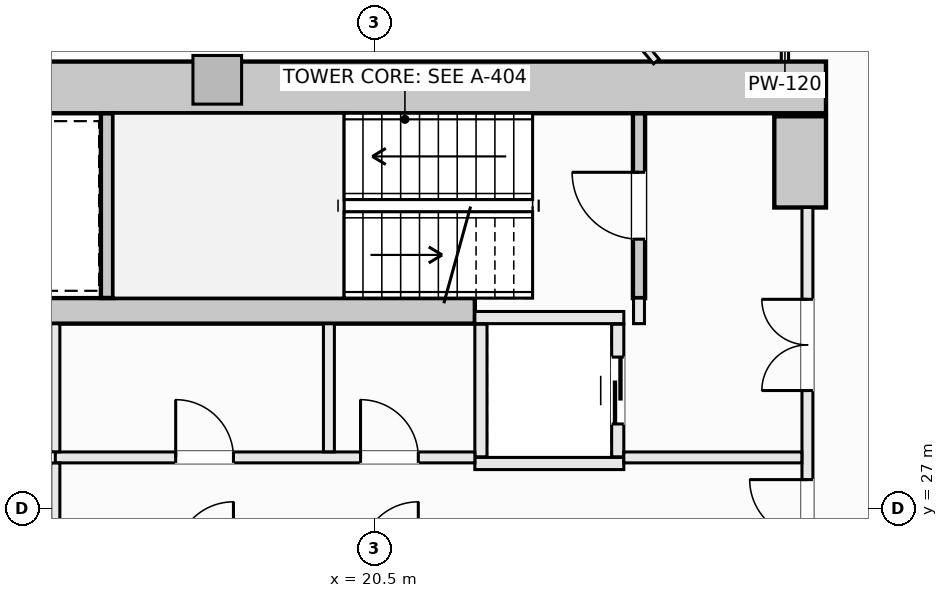
"""IFC4 building model, lengths in metres.
Left out: names, types, materials, properties, quantities, classifications, styles, units other than length and angle.
Written with IfcOpenShell. Run it as: python <this file> out.ifc"""

import sys

from ifc_helpers import new_model, si_unit, direction, frame, frame_2d, origin, origin_2d, place, context, subcontext, project, spatial, rectangle, extrude, element, fill, save


model = new_model("IFC4")
c1 = context("Model", 3, precision=1e-05, world=origin(), true_north=direction((0.0, 1.0)))
c2 = subcontext(c1, "Body", "Model", "MODEL_VIEW")
j1 = project(units=[si_unit("LENGTHUNIT", "METRE"), si_unit("PLANEANGLEUNIT", "RADIAN")], contexts=[c1])
p1 = place(None, origin())
s1 = spatial("IfcSite", under=j1, at=p1, CompositionType="ELEMENT")
p2 = place(p1, origin())
s2 = spatial("IfcBuilding", under=s1, at=p2, CompositionType="ELEMENT")
p3 = place(p2, frame((0.0, 0.0, 84.25)))
s3 = spatial("IfcBuildingStorey", under=s2, at=p3, CompositionType="ELEMENT", Elevation=84.25)
p4 = place(p3, frame((14.075, 33.925, -0.28), z_axis=(0.0, 0.0, 1.0), x_axis=(1.0, 0.0, 0.0)))
e1 = element("IfcWall", 1, at=p4, inside=s3, PredefinedType="SHEAR", context=c2, shape_type="SweptSolid", body=[
    extrude(rectangle(XDim=13.85, YDim=0.85, at=frame_2d((6.925, 0.0))), origin(), (0.0, 0.0, 1.0), 3.85),
])
p5 = place(p3, frame((27.5, 31.95, -0.28), z_axis=(0.0, 0.0, 1.0), x_axis=(0.0, 1.0, 0.0)))
e2 = element("IfcWall", 2, at=p5, inside=s3, PredefinedType="SHEAR", context=c2, shape_type="SweptSolid", body=[
    extrude(rectangle(XDim=1.5, YDim=0.85, at=frame_2d((0.75, 0.0))), origin(), (0.0, 0.0, 1.0), 3.85),
])
p6 = place(p3, frame((14.85, 30.25, -0.28), z_axis=(0.0, 0.0, 1.0), x_axis=(1.0, 0.0, 0.0)))
e3 = element("IfcWall", 3, at=p6, inside=s3, PredefinedType="SHEAR", context=c2, shape_type="SweptSolid", body=[
    extrude(rectangle(XDim=7.3, YDim=0.42, at=frame_2d((3.65, 0.0))), origin(), (0.0, 0.0, 1.0), 3.85),
])
p7 = place(p3, frame((17.914, 34.05, -0.28), z_axis=(0.0, 0.0, 1.0), x_axis=(1.0, 0.0, 0.0)))
e4 = element("IfcColumn", 4, at=p7, inside=s3, PredefinedType="PILASTER", context=c2, shape_type="SweptSolid", body=[
    extrude(rectangle(XDim=0.8, YDim=0.8, at=origin_2d()), origin(), (0.0, 0.0, 1.0), 3.85),
])
p8 = place(p3, frame((24.85, 30.46, -0.28), z_axis=(0.0, 0.0, 1.0), x_axis=(0.0, 1.0, 0.0)))
e5 = element("IfcWall", 5, at=p8, inside=s3, PredefinedType="SHEAR", context=c2, shape_type="SweptSolid", body=[
    extrude(rectangle(XDim=3.038, YDim=0.2, at=frame_2d((1.519, 0.0))), origin(), (0.0, 0.0, 1.0), 3.85),
])
p9 = place(p8, frame((0.969, 0.0, 0.28)))
e6 = element("IfcOpeningElement", 6, at=p9, cuts=e5, PredefinedType="OPENING", context=c2, shape_type="SweptSolid", body=[
    extrude(rectangle(XDim=1.1, YDim=2.15, at=frame_2d((0.55, 1.075))), frame((0.0, 0.11, 0.0), z_axis=(0.0, -1.0, 0.0), x_axis=(1.0, 0.0, 0.0)), (0.0, 0.0, 1.0), 0.22),
])
p10 = place(p3, frame((16.1, 30.462, -0.28), z_axis=(0.0, 0.0, 1.0), x_axis=(0.0, 1.0, 0.0)))
e7 = element("IfcWall", 7, at=p10, inside=s3, PredefinedType="SHEAR", context=c2, shape_type="SweptSolid", body=[
    extrude(rectangle(XDim=3.036, YDim=0.2, at=frame_2d((1.518, 0.0))), origin(), (0.0, 0.0, 1.0), 3.85),
])
for number, where, z_axis, x_axis in (
    (8, (22.15, 30.14, 0.0), (0.0, 0.0, 1.0), (1.0, 0.0, 0.0)),
    (9, (22.15, 27.74, 0.0), (0.0, 0.0, 1.0), (1.0, 0.0, 0.0)),
):
    element("IfcWall", number, at=place(p3, frame(where, z_axis=z_axis, x_axis=x_axis)), inside=s3, PredefinedType="SOLIDWALL", context=c2, shape_type="SweptSolid", body=[
        extrude(rectangle(XDim=2.45, YDim=0.2, at=frame_2d((1.225, 0.0))), origin(), (0.0, 0.0, 1.0), 3.57),
    ])
p11 = place(p3, frame((22.25, 27.85, 0.0), z_axis=(0.0, 0.0, 1.0), x_axis=(0.0, 1.0, 0.0)))
e10 = element("IfcWall", 10, at=p11, inside=s3, PredefinedType="SOLIDWALL", context=c2, shape_type="SweptSolid", body=[
    extrude(rectangle(XDim=2.18, YDim=0.2, at=frame_2d((1.09, 0.0))), origin(), (0.0, 0.0, 1.0), 3.57),
])
p12 = place(p3, frame((24.5, 27.85, 0.0), z_axis=(0.0, 0.0, 1.0), x_axis=(0.0, 1.0, 0.0)))
e11 = element("IfcWall", 11, at=p12, inside=s3, PredefinedType="SOLIDWALL", context=c2, shape_type="SweptSolid", body=[
    extrude(rectangle(XDim=2.18, YDim=0.2, at=frame_2d((1.09, 0.0))), origin(), (0.0, 0.0, 1.0), 3.57),
])
p13 = place(p12, frame((0.54, 0.0, 0.0)))
e12 = element("IfcOpeningElement", 12, at=p13, cuts=e11, PredefinedType="OPENING", context=c2, shape_type="SweptSolid", body=[
    extrude(rectangle(XDim=1.1, YDim=2.2, at=frame_2d((0.55, 1.1))), frame((0.0, 0.11, 0.0), z_axis=(0.0, -1.0, 0.0), x_axis=(1.0, 0.0, 0.0)), (0.0, 0.0, 1.0), 0.22),
])
p14 = place(p3, frame((24.85, 30.04, 0.0), z_axis=(0.0, 0.0, 1.0), x_axis=(0.0, 1.0, 0.0)))
e13 = element("IfcWall", 13, at=p14, inside=s3, PredefinedType="SOLIDWALL", context=c2, shape_type="SweptSolid", body=[
    extrude(rectangle(XDim=0.42, YDim=0.18, at=frame_2d((0.21, 0.0))), origin(), (0.0, 0.0, 1.0), 3.57),
])
p15 = place(p3, frame((27.62, 22.05, 0.0), z_axis=(0.0, 0.0, 1.0), x_axis=(0.0, 1.0, 0.0)))
e14 = element("IfcWall", 14, at=p15, inside=s3, PredefinedType="SOLIDWALL", context=c2, shape_type="SweptSolid", body=[
    extrude(rectangle(XDim=9.9, YDim=0.18, at=frame_2d((4.95, 0.0))), origin(), (0.0, 0.0, 1.0), 2.662),
])
p16 = place(p15, frame((4.475, 0.0, 0.0)))
e15 = element("IfcOpeningElement", 15, at=p16, cuts=e14, PredefinedType="OPENING", context=c2, shape_type="SweptSolid", body=[
    extrude(rectangle(XDim=0.95, YDim=2.1, at=frame_2d((0.475, 1.05))), frame((0.0, 0.1, 0.0), z_axis=(0.0, -1.0, 0.0), x_axis=(1.0, 0.0, 0.0)), (0.0, 0.0, 1.0), 0.2),
])
p17 = place(p15, frame((6.89, 0.0, 0.0)))
e16 = element("IfcOpeningElement", 16, at=p17, cuts=e14, PredefinedType="OPENING", context=c2, shape_type="SweptSolid", body=[
    extrude(rectangle(XDim=1.5, YDim=2.2, at=frame_2d((0.75, 1.1))), frame((0.0, 0.1, 0.0), z_axis=(0.0, -1.0, 0.0), x_axis=(1.0, 0.0, 0.0)), (0.0, 0.0, 1.0), 0.2),
])
p18 = place(p15, frame((1.51, 0.0, 0.0)))
e17 = element("IfcOpeningElement", 17, at=p18, cuts=e14, PredefinedType="OPENING", context=c2, shape_type="SweptSolid", body=[
    extrude(rectangle(XDim=1.5, YDim=2.2, at=frame_2d((0.75, 1.1))), frame((0.0, 0.1, 0.0), z_axis=(0.0, -1.0, 0.0), x_axis=(1.0, 0.0, 0.0)), (0.0, 0.0, 1.0), 0.2),
])
p19 = place(p3, frame((15.25, 27.84, 0.0), z_axis=(0.0, 0.0, 1.0), x_axis=(1.0, 0.0, 0.0)))
e18 = element("IfcWall", 18, at=p19, inside=s3, PredefinedType="SOLIDWALL", context=c2, shape_type="SweptSolid", body=[
    extrude(rectangle(XDim=6.9, YDim=0.18, at=frame_2d((3.45, 0.0))), origin(), (0.0, 0.0, 1.0), 3.57),
])
p20 = place(p19, frame((5.02, 0.0, 0.0)))
e19 = element("IfcOpeningElement", 19, at=p20, cuts=e18, PredefinedType="OPENING", context=c2, shape_type="SweptSolid", body=[
    extrude(rectangle(XDim=0.95, YDim=2.1, at=frame_2d((0.475, 1.05))), frame((0.0, 0.1, 0.0), z_axis=(0.0, -1.0, 0.0), x_axis=(1.0, 0.0, 0.0)), (0.0, 0.0, 1.0), 0.2),
])
p21 = place(p19, frame((1.98, 0.0, 0.0)))
e20 = element("IfcOpeningElement", 20, at=p21, cuts=e18, PredefinedType="OPENING", context=c2, shape_type="SweptSolid", body=[
    extrude(rectangle(XDim=0.95, YDim=2.1, at=frame_2d((0.475, 1.05))), frame((0.0, 0.1, 0.0), z_axis=(0.0, -1.0, 0.0), x_axis=(1.0, 0.0, 0.0)), (0.0, 0.0, 1.0), 0.2),
])
p22 = place(p3, frame((24.6, 27.84, 0.0), z_axis=(0.0, 0.0, 1.0), x_axis=(1.0, 0.0, 0.0)))
e21 = element("IfcWall", 21, at=p22, inside=s3, PredefinedType="SOLIDWALL", context=c2, shape_type="SweptSolid", body=[
    extrude(rectangle(XDim=2.928, YDim=0.18, at=frame_2d((1.464, 0.0))), origin(), (0.0, 0.0, 1.0), 3.57),
])
p23 = place(p3, frame((15.25, 26.252, 0.0), z_axis=(0.0, 0.0, 1.0), x_axis=(0.0, 1.0, 0.0)))
e22 = element("IfcWall", 22, at=p23, inside=s3, PredefinedType="PARTITIONING", context=c2, shape_type="SweptSolid", body=[
    extrude(rectangle(XDim=1.496, YDim=0.15, at=frame_2d((0.748, 0.0))), origin(), (0.0, 0.0, 1.0), 3.57),
])
p24 = place(p3, frame((15.25, 27.932, 0.0), z_axis=(0.0, 0.0, 1.0), x_axis=(0.0, 1.0, 0.0)))
e23 = element("IfcWall", 23, at=p24, inside=s3, PredefinedType="PARTITIONING", context=c2, shape_type="SweptSolid", body=[
    extrude(rectangle(XDim=2.106, YDim=0.15, at=frame_2d((1.053, 0.0))), origin(), (0.0, 0.0, 1.0), 3.57),
])
p25 = place(p3, frame((19.75, 27.932, 0.0), z_axis=(0.0, 0.0, 1.0), x_axis=(0.0, 1.0, 0.0)))
e24 = element("IfcWall", 24, at=p25, inside=s3, PredefinedType="SOLIDWALL", context=c2, shape_type="SweptSolid", body=[
    extrude(rectangle(XDim=2.106, YDim=0.18, at=frame_2d((1.053, 0.0))), origin(), (0.0, 0.0, 1.0), 3.57),
])
p26 = place(p3, frame((27.25, 34.352, 0.0), z_axis=(0.0, 0.0, 1.0), x_axis=(0.0, 1.0, 0.0)))
e25 = element("IfcWall", 25, at=p26, inside=s3, PredefinedType="PARTITIONING", context=c2, shape_type="SweptSolid", body=[
    extrude(rectangle(XDim=0.606, YDim=0.12, at=frame_2d((0.303, 0.0))), origin(), (0.0, 0.0, 1.0), 3.57),
])
p27 = place(p3, frame((24.626, 34.958, 0.0), z_axis=(0.0, 0.0, 1.0), x_axis=(0.643032873298, -0.765838575588, 0.0)))
e26 = element("IfcWall", 26, at=p27, inside=s3, PredefinedType="PARTITIONING", context=c2, shape_type="SweptSolid", body=[
    extrude(rectangle(XDim=0.791, YDim=0.12, at=frame_2d((0.396, 0.0))), origin(), (0.0, 0.0, 1.0), 3.57),
])
p28 = place(p9, origin())
e27 = element("IfcDoor", 27, at=p28, inside=s3, OperationType="SINGLE_SWING_RIGHT", PredefinedType="DOOR", context=c2, shape_type="SweptSolid", body=[
    extrude(rectangle(XDim=1.1, YDim=2.15, at=frame_2d((0.55, 1.075))), frame((0.0, 0.025, 0.0), z_axis=(0.0, -1.0, 0.0), x_axis=(1.0, 0.0, 0.0)), (0.0, 0.0, 1.0), 0.05),
])
fill(e6, e27)
p29 = place(p13, origin())
e28 = element("IfcDoor", 28, at=p29, inside=s3, OperationType="SLIDING_TO_LEFT", PredefinedType="DOOR", context=c2, shape_type="SweptSolid", body=[
    extrude(rectangle(XDim=1.1, YDim=2.2, at=frame_2d((0.55, 1.1))), frame((0.0, 0.025, 0.0), z_axis=(0.0, -1.0, 0.0), x_axis=(1.0, 0.0, 0.0)), (0.0, 0.0, 1.0), 0.05),
])
fill(e12, e28)
p30 = place(p16, origin())
e29 = element("IfcDoor", 29, at=p30, inside=s3, OperationType="SINGLE_SWING_RIGHT", PredefinedType="DOOR", context=c2, shape_type="SweptSolid", body=[
    extrude(rectangle(XDim=0.95, YDim=2.1, at=frame_2d((0.475, 1.05))), frame((0.0, 0.025, 0.0), z_axis=(0.0, -1.0, 0.0), x_axis=(1.0, 0.0, 0.0)), (0.0, 0.0, 1.0), 0.05),
])
fill(e15, e29)
p31 = place(p17, origin())
e30 = element("IfcDoor", 30, at=p31, inside=s3, OperationType="DOUBLE_DOOR_SINGLE_SWING", PredefinedType="DOOR", context=c2, shape_type="SweptSolid", body=[
    extrude(rectangle(XDim=1.5, YDim=2.2, at=frame_2d((0.75, 1.1))), frame((0.0, 0.025, 0.0), z_axis=(0.0, -1.0, 0.0), x_axis=(1.0, 0.0, 0.0)), (0.0, 0.0, 1.0), 0.05),
])
fill(e16, e30)
p32 = place(p20, origin())
e31 = element("IfcDoor", 31, at=p32, inside=s3, OperationType="SINGLE_SWING_LEFT", PredefinedType="DOOR", context=c2, shape_type="SweptSolid", body=[
    extrude(rectangle(XDim=0.95, YDim=2.1, at=frame_2d((0.475, 1.05))), frame((0.0, 0.025, 0.0), z_axis=(0.0, -1.0, 0.0), x_axis=(1.0, 0.0, 0.0)), (0.0, 0.0, 1.0), 0.05),
])
fill(e19, e31)
p33 = place(p21, origin())
e32 = element("IfcDoor", 32, at=p33, inside=s3, OperationType="SINGLE_SWING_LEFT", PredefinedType="DOOR", context=c2, shape_type="SweptSolid", body=[
    extrude(rectangle(XDim=0.95, YDim=2.1, at=frame_2d((0.475, 1.05))), frame((0.0, 0.025, 0.0), z_axis=(0.0, -1.0, 0.0), x_axis=(1.0, 0.0, 0.0)), (0.0, 0.0, 1.0), 0.05),
])
fill(e20, e32)
save(model, sys.argv[1])
